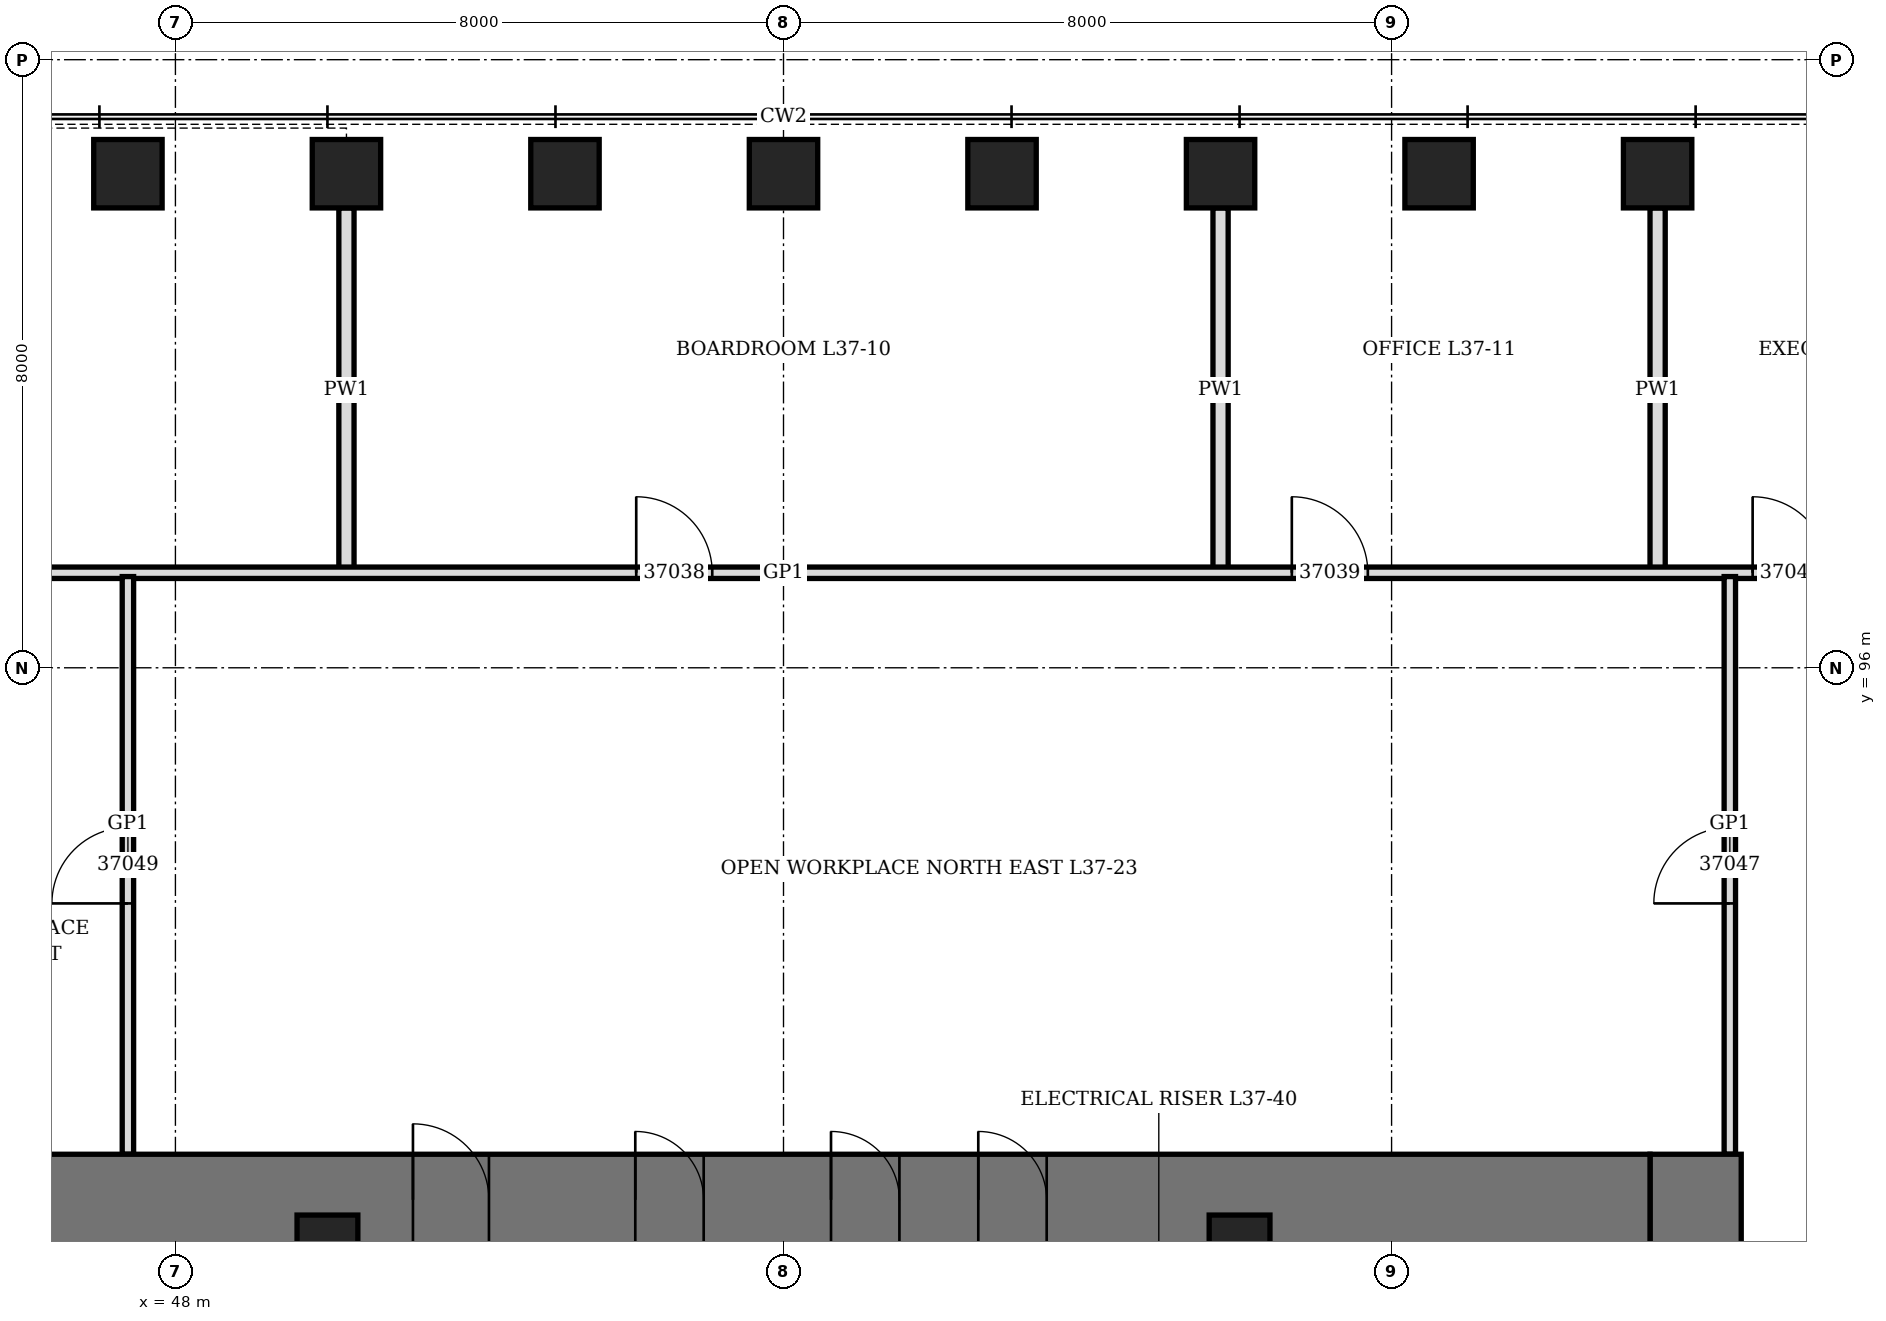
"""IFC4 building model, lengths in metres.
Left out: names, types, materials, properties, quantities, classifications, styles, units other than length and angle.
Written with IfcOpenShell. Run it as: python <this file> out.ifc"""

import sys

from ifc_helpers import new_model, si_unit, direction, frame, frame_2d, origin, origin_2d, place, context, subcontext, project, spatial, rectangle, hollow_rectangle, extrude, element, fill, save


model = new_model("IFC4")
c1 = context("Model", 3, precision=1e-05, world=origin(), true_north=direction((0.0, 1.0)))
c2 = subcontext(c1, "Body", "Model", "MODEL_VIEW")
j1 = project(units=[si_unit("LENGTHUNIT", "METRE"), si_unit("PLANEANGLEUNIT", "RADIAN")], contexts=[c1])
p1 = place(None, origin())
s1 = spatial("IfcSite", under=j1, at=p1, CompositionType="ELEMENT")
p2 = place(p1, origin())
s2 = spatial("IfcBuilding", under=s1, at=p2, CompositionType="ELEMENT")
p3 = place(p2, frame((0.0, 0.0, 166.9)))
s3 = spatial("IfcBuildingStorey", under=s2, at=p3, CompositionType="ELEMENT", Elevation=166.9)
for number, where, z_axis, x_axis in (
    (1, (67.5, 102.5, 0.0), (0.0, 0.0, 1.0), (1.0, 0.0, 0.0)),
    (2, (64.625, 102.5, 0.0), (0.0, 0.0, 1.0), (1.0, 0.0, 0.0)),
    (3, (61.75, 102.5, 0.0), (0.0, 0.0, 1.0), (1.0, 0.0, 0.0)),
    (4, (58.875, 102.5, 0.0), (0.0, 0.0, 1.0), (1.0, 0.0, 0.0)),
    (5, (56.0, 102.5, 0.0), (0.0, 0.0, 1.0), (1.0, 0.0, 0.0)),
    (6, (53.125, 102.5, 0.0), (0.0, 0.0, 1.0), (1.0, 0.0, 0.0)),
    (7, (50.25, 102.5, 0.0), (0.0, 0.0, 1.0), (1.0, 0.0, 0.0)),
    (8, (47.375, 102.5, 0.0), (0.0, 0.0, 1.0), (1.0, 0.0, 0.0)),
):
    element("IfcColumn", number, at=place(p3, frame(where, z_axis=z_axis, x_axis=x_axis)), inside=s3, PredefinedType="COLUMN", context=c2, shape_type="SweptSolid", body=[
        extrude(hollow_rectangle(XDim=0.9, YDim=0.9, WallThickness=0.12, at=origin_2d()), origin(), (0.0, 0.0, 1.0), 4.2),
    ])
p4 = place(p3, frame((68.0, 70.4, 0.0), z_axis=(0.0, 0.0, 1.0), x_axis=(0.0, 1.0, 0.0)))
e9 = element("IfcWall", 9, at=p4, inside=s3, PredefinedType="SHEAR", context=c2, shape_type="SweptSolid", body=[
    extrude(rectangle(XDim=19.2, YDim=1.2, at=frame_2d((9.6, 0.0))), origin(), (0.0, 0.0, 1.0), 4.2),
])
p5 = place(p4, frame((8.6, 0.0, 0.0)))
e10 = element("IfcOpeningElement", 10, at=p5, cuts=e9, PredefinedType="OPENING", context=c2, shape_type="SweptSolid", body=[
    extrude(rectangle(XDim=2.0, YDim=2.4, at=frame_2d((1.0, 1.2))), frame((0.0, 0.61, 0.0), z_axis=(0.0, -1.0, 0.0), x_axis=(1.0, 0.0, 0.0)), (0.0, 0.0, 1.0), 1.22),
])
p6 = place(p3, frame((44.6, 89.0, 0.0), z_axis=(0.0, 0.0, 1.0), x_axis=(1.0, 0.0, 0.0)))
e11 = element("IfcWall", 11, at=p6, inside=s3, PredefinedType="SHEAR", context=c2, shape_type="SweptSolid", body=[
    extrude(rectangle(XDim=22.8, YDim=1.2, at=frame_2d((11.4, 0.0))), origin(), (0.0, 0.0, 1.0), 4.2),
])
p7 = place(p6, frame((6.525, 0.0, 0.0)))
e12 = element("IfcOpeningElement", 12, at=p7, cuts=e11, PredefinedType="OPENING", context=c2, shape_type="SweptSolid", body=[
    extrude(rectangle(XDim=1.0, YDim=2.1, at=frame_2d((0.5, 1.05))), frame((0.0, 0.61, 0.0), z_axis=(0.0, -1.0, 0.0), x_axis=(1.0, 0.0, 0.0)), (0.0, 0.0, 1.0), 1.22),
])
p8 = place(p6, frame((9.45, 0.0, 0.0)))
e13 = element("IfcOpeningElement", 13, at=p8, cuts=e11, PredefinedType="OPENING", context=c2, shape_type="SweptSolid", body=[
    extrude(rectangle(XDim=0.9, YDim=2.1, at=frame_2d((0.45, 1.05))), frame((0.0, 0.61, 0.0), z_axis=(0.0, -1.0, 0.0), x_axis=(1.0, 0.0, 0.0)), (0.0, 0.0, 1.0), 1.22),
])
p9 = place(p6, frame((12.025, 0.0, 0.0)))
e14 = element("IfcOpeningElement", 14, at=p9, cuts=e11, PredefinedType="OPENING", context=c2, shape_type="SweptSolid", body=[
    extrude(rectangle(XDim=0.9, YDim=2.1, at=frame_2d((0.45, 1.05))), frame((0.0, 0.61, 0.0), z_axis=(0.0, -1.0, 0.0), x_axis=(1.0, 0.0, 0.0)), (0.0, 0.0, 1.0), 1.22),
])
p10 = place(p6, frame((13.962, 0.0, 0.0)))
e15 = element("IfcOpeningElement", 15, at=p10, cuts=e11, PredefinedType="OPENING", context=c2, shape_type="SweptSolid", body=[
    extrude(rectangle(XDim=0.9, YDim=2.1, at=frame_2d((0.45, 1.05))), frame((0.0, 0.61, 0.0), z_axis=(0.0, -1.0, 0.0), x_axis=(1.0, 0.0, 0.0)), (0.0, 0.0, 1.0), 1.22),
])
for number, where, z_axis, x_axis in (
    (16, (50.0, 88.4, 0.0), (0.0, 0.0, 1.0), (1.0, 0.0, 0.0)),
    (17, (62.0, 88.4, 0.0), (0.0, 0.0, 1.0), (1.0, 0.0, 0.0)),
):
    element("IfcColumn", number, at=place(p3, frame(where, z_axis=z_axis, x_axis=x_axis)), inside=s3, PredefinedType="COLUMN", context=c2, shape_type="SweptSolid", body=[
        extrude(hollow_rectangle(XDim=0.8, YDim=0.8, WallThickness=0.1, at=origin_2d()), origin(), (0.0, 0.0, 1.0), 4.2),
    ])
for number, where, z_axis, x_axis in (
    (18, (50.25, 97.25, 0.0), (0.0, 0.0, 1.0), (0.0, 1.0, 0.0)),
    (19, (61.75, 97.25, 0.0), (0.0, 0.0, 1.0), (0.0, 1.0, 0.0)),
):
    element("IfcWall", number, at=place(p3, frame(where, z_axis=z_axis, x_axis=x_axis)), inside=s3, PredefinedType="PARTITIONING", context=c2, shape_type="SweptSolid", body=[
        extrude(rectangle(XDim=4.8, YDim=0.2, at=frame_2d((2.4, 0.0))), origin(), (0.0, 0.0, 1.0), 3.278),
    ])
p11 = place(p3, frame((67.5, 97.25, 0.0), z_axis=(0.0, 0.0, 1.0), x_axis=(0.0, 1.0, 0.0)))
e20 = element("IfcWall", 20, at=p11, inside=s3, PredefinedType="PARTITIONING", context=c2, shape_type="SweptSolid", body=[
    extrude(rectangle(XDim=4.8, YDim=0.2, at=frame_2d((2.4, 0.0))), origin(), (0.0, 0.0, 1.0), 2.74),
])
p12 = place(p3, frame((39.2, 97.25, 0.0), z_axis=(0.0, 0.0, 1.0), x_axis=(1.0, 0.0, 0.0)))
e21 = element("IfcWall", 21, at=p12, inside=s3, PredefinedType="PARTITIONING", context=c2, shape_type="SweptSolid", body=[
    extrude(rectangle(XDim=33.6, YDim=0.15, at=frame_2d((16.8, 0.0))), origin(), (0.0, 0.0, 1.0), 4.04),
])
p13 = place(p12, frame((3.05, 0.0, 0.0)))
e22 = element("IfcOpeningElement", 22, at=p13, cuts=e21, PredefinedType="OPENING", context=c2, shape_type="SweptSolid", body=[
    extrude(rectangle(XDim=1.0, YDim=2.4, at=frame_2d((0.5, 1.2))), frame((0.0, 0.085, 0.0), z_axis=(0.0, -1.0, 0.0), x_axis=(1.0, 0.0, 0.0)), (0.0, 0.0, 1.0), 0.17),
])
p14 = place(p12, frame((14.863, 0.0, 0.0)))
e23 = element("IfcOpeningElement", 23, at=p14, cuts=e21, PredefinedType="OPENING", context=c2, shape_type="SweptSolid", body=[
    extrude(rectangle(XDim=1.0, YDim=2.4, at=frame_2d((0.5, 1.2))), frame((0.0, 0.085, 0.0), z_axis=(0.0, -1.0, 0.0), x_axis=(1.0, 0.0, 0.0)), (0.0, 0.0, 1.0), 0.17),
])
p15 = place(p12, frame((23.488, 0.0, 0.0)))
e24 = element("IfcOpeningElement", 24, at=p15, cuts=e21, PredefinedType="OPENING", context=c2, shape_type="SweptSolid", body=[
    extrude(rectangle(XDim=1.0, YDim=2.1, at=frame_2d((0.5, 1.05))), frame((0.0, 0.085, 0.0), z_axis=(0.0, -1.0, 0.0), x_axis=(1.0, 0.0, 0.0)), (0.0, 0.0, 1.0), 0.17),
])
p16 = place(p12, frame((29.55, 0.0, 0.0)))
e25 = element("IfcOpeningElement", 25, at=p16, cuts=e21, PredefinedType="OPENING", context=c2, shape_type="SweptSolid", body=[
    extrude(rectangle(XDim=1.0, YDim=2.1, at=frame_2d((0.5, 1.05))), frame((0.0, 0.085, 0.0), z_axis=(0.0, -1.0, 0.0), x_axis=(1.0, 0.0, 0.0)), (0.0, 0.0, 1.0), 0.17),
])
p17 = place(p3, frame((47.375, 89.6, 0.0), z_axis=(0.0, 0.0, 1.0), x_axis=(0.0, 1.0, 0.0)))
e26 = element("IfcWall", 26, at=p17, inside=s3, PredefinedType="PARTITIONING", context=c2, shape_type="SweptSolid", body=[
    extrude(rectangle(XDim=7.6, YDim=0.15, at=frame_2d((3.8, 0.0))), origin(), (0.0, 0.0, 1.0), 3.278),
])
p18 = place(p17, frame((3.3, 0.0, 0.0)))
e27 = element("IfcOpeningElement", 27, at=p18, cuts=e26, PredefinedType="OPENING", context=c2, shape_type="SweptSolid", body=[
    extrude(rectangle(XDim=1.0, YDim=2.4, at=frame_2d((0.5, 1.2))), frame((0.0, 0.085, 0.0), z_axis=(0.0, -1.0, 0.0), x_axis=(1.0, 0.0, 0.0)), (0.0, 0.0, 1.0), 0.17),
])
p19 = place(p3, frame((68.45, 89.6, 0.0), z_axis=(0.0, 0.0, 1.0), x_axis=(0.0, 1.0, 0.0)))
e28 = element("IfcWall", 28, at=p19, inside=s3, PredefinedType="PARTITIONING", context=c2, shape_type="SweptSolid", body=[
    extrude(rectangle(XDim=7.6, YDim=0.15, at=frame_2d((3.8, 0.0))), origin(), (0.0, 0.0, 1.0), 4.04),
])
p20 = place(p19, frame((3.3, 0.0, 0.0)))
e29 = element("IfcOpeningElement", 29, at=p20, cuts=e28, PredefinedType="OPENING", context=c2, shape_type="SweptSolid", body=[
    extrude(rectangle(XDim=1.0, YDim=2.4, at=frame_2d((0.5, 1.2))), frame((0.0, 0.085, 0.0), z_axis=(0.0, -1.0, 0.0), x_axis=(1.0, 0.0, 0.0)), (0.0, 0.0, 1.0), 0.17),
])
p21 = place(p7, origin())
e30 = element("IfcDoor", 30, at=p21, inside=s3, OperationType="SINGLE_SWING_LEFT", PredefinedType="DOOR", context=c2, shape_type="SweptSolid", body=[
    extrude(rectangle(XDim=1.0, YDim=2.1, at=frame_2d((0.5, 1.05))), frame((0.0, 0.35, 0.0), z_axis=(0.0, -1.0, 0.0), x_axis=(1.0, 0.0, 0.0)), (0.0, 0.0, 1.0), 0.7),
])
fill(e12, e30)
p22 = place(p8, origin())
e31 = element("IfcDoor", 31, at=p22, inside=s3, OperationType="SINGLE_SWING_LEFT", PredefinedType="DOOR", context=c2, shape_type="SweptSolid", body=[
    extrude(rectangle(XDim=0.9, YDim=2.1, at=frame_2d((0.45, 1.05))), frame((0.0, 0.35, 0.0), z_axis=(0.0, -1.0, 0.0), x_axis=(1.0, 0.0, 0.0)), (0.0, 0.0, 1.0), 0.7),
])
fill(e13, e31)
p23 = place(p9, origin())
e32 = element("IfcDoor", 32, at=p23, inside=s3, OperationType="SINGLE_SWING_LEFT", PredefinedType="DOOR", context=c2, shape_type="SweptSolid", body=[
    extrude(rectangle(XDim=0.9, YDim=2.1, at=frame_2d((0.45, 1.05))), frame((0.0, 0.35, 0.0), z_axis=(0.0, -1.0, 0.0), x_axis=(1.0, 0.0, 0.0)), (0.0, 0.0, 1.0), 0.7),
])
fill(e14, e32)
p24 = place(p10, origin())
e33 = element("IfcDoor", 33, at=p24, inside=s3, OperationType="SINGLE_SWING_LEFT", PredefinedType="DOOR", context=c2, shape_type="SweptSolid", body=[
    extrude(rectangle(XDim=0.9, YDim=2.1, at=frame_2d((0.45, 1.05))), frame((0.0, 0.35, 0.0), z_axis=(0.0, -1.0, 0.0), x_axis=(1.0, 0.0, 0.0)), (0.0, 0.0, 1.0), 0.7),
])
fill(e15, e33)
p25 = place(p14, origin())
e34 = element("IfcDoor", 34, at=p25, inside=s3, OperationType="SINGLE_SWING_RIGHT", PredefinedType="DOOR", context=c2, shape_type="SweptSolid", body=[
    extrude(rectangle(XDim=1.0, YDim=2.4, at=frame_2d((0.5, 1.2))), frame((0.0, 0.075, 0.0), z_axis=(0.0, -1.0, 0.0), x_axis=(1.0, 0.0, 0.0)), (0.0, 0.0, 1.0), 0.149),
])
fill(e23, e34)
p26 = place(p15, origin())
e35 = element("IfcDoor", 35, at=p26, inside=s3, OperationType="SINGLE_SWING_LEFT", PredefinedType="DOOR", context=c2, shape_type="SweptSolid", body=[
    extrude(rectangle(XDim=1.0, YDim=2.1, at=frame_2d((0.5, 1.05))), frame((0.0, 0.075, 0.0), z_axis=(0.0, -1.0, 0.0), x_axis=(1.0, 0.0, 0.0)), (0.0, 0.0, 1.0), 0.149),
])
fill(e24, e35)
p27 = place(p16, origin())
e36 = element("IfcDoor", 36, at=p27, inside=s3, OperationType="SINGLE_SWING_LEFT", PredefinedType="DOOR", context=c2, shape_type="SweptSolid", body=[
    extrude(rectangle(XDim=1.0, YDim=2.1, at=frame_2d((0.5, 1.05))), frame((0.0, 0.075, 0.0), z_axis=(0.0, -1.0, 0.0), x_axis=(1.0, 0.0, 0.0)), (0.0, 0.0, 1.0), 0.149),
])
fill(e25, e36)
p28 = place(p20, origin())
e37 = element("IfcDoor", 37, at=p28, inside=s3, OperationType="SINGLE_SWING_RIGHT", PredefinedType="DOOR", context=c2, shape_type="SweptSolid", body=[
    extrude(rectangle(XDim=1.0, YDim=2.4, at=frame_2d((0.5, 1.2))), frame((0.0, 0.075, 0.0), z_axis=(0.0, -1.0, 0.0), x_axis=(1.0, 0.0, 0.0)), (0.0, 0.0, 1.0), 0.149),
])
fill(e29, e37)
p29 = place(p18, origin())
e38 = element("IfcDoor", 38, at=p29, inside=s3, OperationType="SINGLE_SWING_RIGHT", PredefinedType="DOOR", context=c2, shape_type="SweptSolid", body=[
    extrude(rectangle(XDim=1.0, YDim=2.4, at=frame_2d((0.5, 1.2))), frame((0.0, 0.075, 0.0), z_axis=(0.0, -1.0, 0.0), x_axis=(1.0, 0.0, 0.0)), (0.0, 0.0, 1.0), 0.149),
])
fill(e27, e38)
save(model, sys.argv[1])
